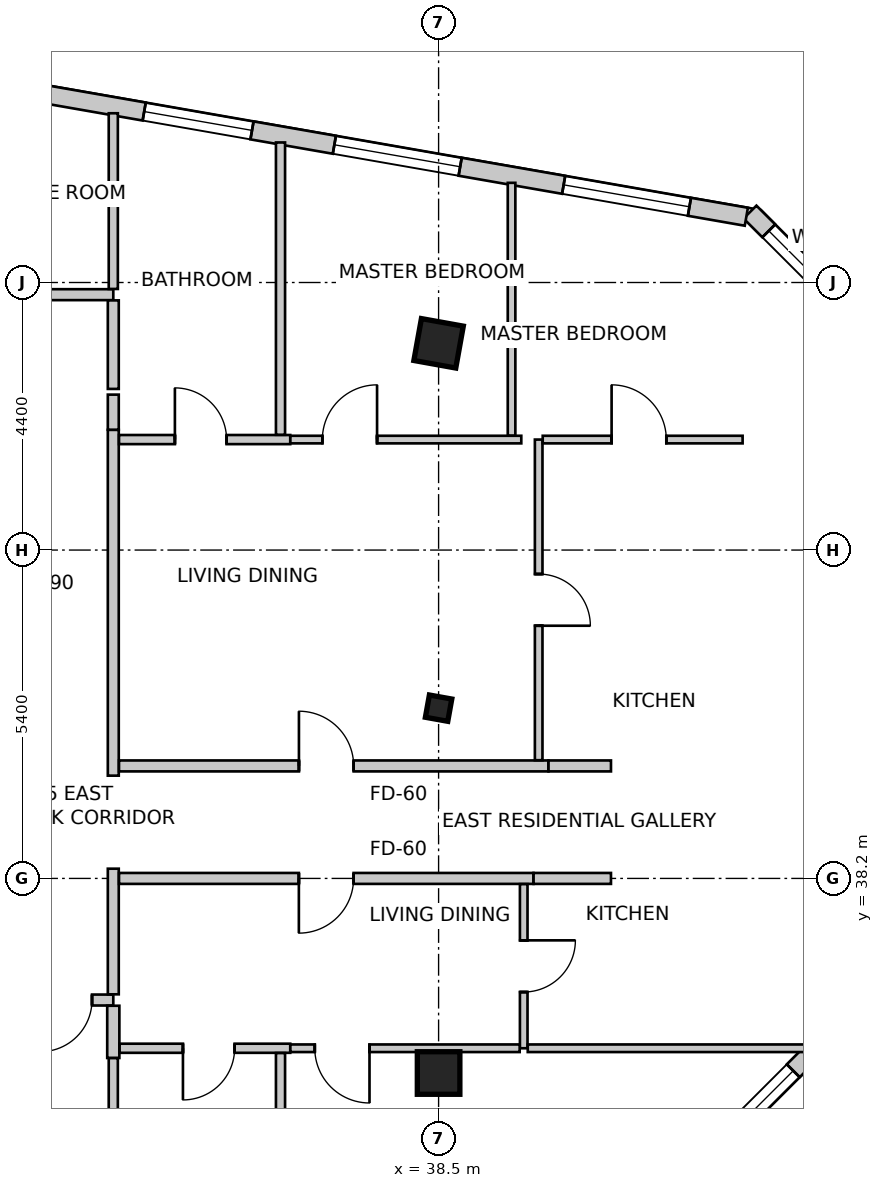
"""IFC4 building model, lengths in metres.
Left out: names, types, materials, properties, quantities, classifications, styles, units other than length and angle.
Written with IfcOpenShell. Run it as: python <this file> out.ifc"""

import sys

from ifc_helpers import new_model, si_unit, direction, frame, frame_2d, origin, origin_2d, place, context, subcontext, project, spatial, rectangle, i_section, extrude, source, transform, mapped, element, fill, save


model = new_model("IFC4")
c1 = context("Model", 3, precision=1e-05, world=origin(), true_north=direction((0.0, 1.0)))
c2 = subcontext(c1, "Body", "Model", "MODEL_VIEW")
j1 = project(units=[si_unit("LENGTHUNIT", "METRE"), si_unit("PLANEANGLEUNIT", "RADIAN")], contexts=[c1])
p1 = place(None, origin())
s1 = spatial("IfcSite", under=j1, at=p1, CompositionType="ELEMENT")
p2 = place(p1, origin())
s2 = spatial("IfcBuilding", under=s1, at=p2, CompositionType="ELEMENT")
p3 = place(p2, frame((0.0, 0.0, 218.4)))
s3 = spatial("IfcBuildingStorey", under=s2, at=p3, CompositionType="ELEMENT", Elevation=218.4)
m1 = source(origin(), c2, "Body", "SweptSolid", [
    extrude(rectangle(XDim=0.7, YDim=0.7, at=origin_2d()), origin(), (0.0, 0.0, 1.0), 3.5),
])
for number, where, z_axis, x_axis in (
    (1, (38.5, 47.0, 0.0), (0.0, 0.0, 1.0), (0.984, -0.177, 0.0)),
    (2, (38.5, 35.0, 0.0), (0.0, 0.0, 1.0), (1.0, 0.0, 0.0)),
):
    element("IfcColumn", number, at=place(p3, frame(where, z_axis=z_axis, x_axis=x_axis)), inside=s3, PredefinedType="COLUMN", context=c2, shape_type="MappedRepresentation", body=[
        mapped(m1, transform((0.0, 0.0, 0.0), scale=1.0)),
    ])
m2 = source(origin(), c2, "Body", "SweptSolid", [
    extrude(i_section(OverallWidth=0.374, OverallDepth=0.372, WebThickness=0.016, FlangeThickness=0.026, FilletRadius=0.015, at=origin_2d()), origin(), (0.0, 0.0, 1.0), 3.5),
])
p4 = place(p3, frame((38.5, 41.0, 0.0), z_axis=(0.0, 0.0, 1.0), x_axis=(0.984195607969, -0.17708474032, 0.0)))
e3 = element("IfcColumn", 3, at=p4, inside=s3, PredefinedType="COLUMN", context=c2, shape_type="MappedRepresentation", body=[
    mapped(m2, transform((0.0, 0.0, 0.0), scale=1.0)),
])
p5 = place(p3, frame((42.276, 32.98, 0.0), z_axis=(0.0, 0.0, 1.0), x_axis=(0.707106781187, 0.707106781187, 0.0)))
e4 = element("IfcWall", 4, at=p5, inside=s3, PredefinedType="SOLIDWALL", context=c2, shape_type="SweptSolid", body=[
    extrude(rectangle(XDim=4.922, YDim=0.3, at=frame_2d((2.461, 0.0))), origin(), (0.0, 0.0, 1.0), 3.25),
])
m3 = source(origin(), c2, "Body", "SweptSolid", [
    extrude(rectangle(XDim=2.4, YDim=2.2, at=frame_2d((1.2, 1.1))), frame((0.0, 0.16, 0.0), z_axis=(0.0, -1.0, 0.0), x_axis=(1.0, 0.0, 0.0)), (0.0, 0.0, 1.0), 0.32),
])
p6 = place(p5, frame((0.509, 0.0, 0.85)))
e5 = element("IfcOpeningElement", 5, at=p6, cuts=e4, PredefinedType="OPENING", context=c2, shape_type="MappedRepresentation", body=[
    mapped(m3, transform((0.0, 0.0, 0.0), scale=1.0)),
])
p7 = place(p3, frame((45.512, 47.268, 0.0), z_axis=(0.0, 0.0, 1.0), x_axis=(-0.707106781187, 0.707106781187, 0.0)))
e6 = element("IfcWall", 6, at=p7, inside=s3, PredefinedType="SOLIDWALL", context=c2, shape_type="SweptSolid", body=[
    extrude(rectangle(XDim=2.674, YDim=0.3, at=frame_2d((1.337, 0.0))), origin(), (0.0, 0.0, 1.0), 3.25),
])
m4 = source(origin(), c2, "Body", "SweptSolid", [
    extrude(rectangle(XDim=1.8, YDim=2.1, at=frame_2d((0.9, 1.05))), frame((0.0, 0.16, 0.0), z_axis=(0.0, -1.0, 0.0), x_axis=(1.0, 0.0, 0.0)), (0.0, 0.0, 1.0), 0.32),
])
p8 = place(p7, frame((0.437, 0.0, 0.85)))
e7 = element("IfcOpeningElement", 7, at=p8, cuts=e6, PredefinedType="OPENING", context=c2, shape_type="MappedRepresentation", body=[
    mapped(m4, transform((0.0, 0.0, 0.0), scale=1.0)),
])
p9 = place(p3, frame((43.561, 49.081, 0.0), z_axis=(0.0, 0.0, 1.0), x_axis=(-0.985083967494, 0.17207433564, 0.0)))
e8 = element("IfcWall", 8, at=p9, inside=s3, PredefinedType="SOLIDWALL", context=c2, shape_type="SweptSolid", body=[
    extrude(rectangle(XDim=22.006, YDim=0.3, at=frame_2d((11.003, 0.0))), origin(), (0.0, 0.0, 1.0), 3.25),
])
m5 = source(origin(), c2, "Body", "SweptSolid", [
    extrude(rectangle(XDim=2.1, YDim=2.0, at=frame_2d((1.05, 1.0))), frame((0.0, 0.16, 0.0), z_axis=(0.0, -1.0, 0.0), x_axis=(1.0, 0.0, 0.0)), (0.0, 0.0, 1.0), 0.32),
])
p10 = place(p9, frame((0.95, 0.0, 0.85)))
e9 = element("IfcOpeningElement", 9, at=p10, cuts=e8, PredefinedType="OPENING", context=c2, shape_type="MappedRepresentation", body=[
    mapped(m5, transform((0.0, 0.0, 0.0), scale=1.0)),
])
p11 = place(p9, frame((4.778, 0.0, 0.85)))
e10 = element("IfcOpeningElement", 10, at=p11, cuts=e8, PredefinedType="OPENING", context=c2, shape_type="MappedRepresentation", body=[
    mapped(m5, transform((0.0, 0.0, 0.0), scale=1.0)),
])
p12 = place(p9, frame((8.253, 0.0, 0.85)))
e11 = element("IfcOpeningElement", 11, at=p12, cuts=e8, PredefinedType="OPENING", context=c2, shape_type="MappedRepresentation", body=[
    mapped(m4, transform((0.0, 0.0, 0.0), scale=1.0)),
])
p13 = place(p9, frame((12.113, 0.0, 0.85)))
e12 = element("IfcOpeningElement", 12, at=p13, cuts=e8, PredefinedType="OPENING", context=c2, shape_type="MappedRepresentation", body=[
    mapped(m5, transform((0.0, 0.0, 0.0), scale=1.0)),
])
p14 = place(p9, frame((16.197, 0.0, 0.85)))
e13 = element("IfcOpeningElement", 13, at=p14, cuts=e8, PredefinedType="OPENING", context=c2, shape_type="MappedRepresentation", body=[
    mapped(m4, transform((0.0, 0.0, 0.0), scale=1.0)),
])
p15 = place(p9, frame((19.111, 0.0, 0.85)))
e14 = element("IfcOpeningElement", 14, at=p15, cuts=e8, PredefinedType="OPENING", context=c2, shape_type="MappedRepresentation", body=[
    mapped(m5, transform((0.0, 0.0, 0.0), scale=1.0)),
])
p16 = place(p3, frame((28.162, 47.8, 0.0), z_axis=(0.0, 0.0, 1.0), x_axis=(1.0, 0.0, 0.0)))
e15 = element("IfcWall", 15, at=p16, inside=s3, PredefinedType="PARTITIONING", context=c2, shape_type="SweptSolid", body=[
    extrude(rectangle(XDim=4.988, YDim=0.18, at=frame_2d((2.494, 0.0))), origin(), (0.0, 0.0, 1.0), 2.779),
])
m6 = source(origin(), c2, "Body", "SweptSolid", [
    extrude(rectangle(XDim=0.85, YDim=2.15, at=frame_2d((0.425, 1.075))), frame((0.0, 0.1, 0.0), z_axis=(0.0, -1.0, 0.0), x_axis=(1.0, 0.0, 0.0)), (0.0, 0.0, 1.0), 0.2),
])
p17 = place(p16, frame((0.403, 0.0, 0.0)))
e16 = element("IfcOpeningElement", 16, at=p17, cuts=e15, PredefinedType="OPENING", context=c2, shape_type="MappedRepresentation", body=[
    mapped(m6, transform((0.0, 0.0, 0.0), scale=1.0)),
])
p18 = place(p3, frame((33.15, 47.706, 0.0), z_axis=(0.0, 0.0, 1.0), x_axis=(0.0, -1.0, 0.0)))
e17 = element("IfcWall", 17, at=p18, inside=s3, PredefinedType="PARTITIONING", context=c2, shape_type="SweptSolid", body=[
    extrude(rectangle(XDim=1.456, YDim=0.18, at=frame_2d((0.728, 0.0))), origin(), (0.0, 0.0, 1.0), 2.919),
])
p19 = place(p3, frame((33.15, 36.2, 0.0), z_axis=(0.0, 0.0, 1.0), x_axis=(-1.0, 0.0, 0.0)))
e18 = element("IfcWall", 18, at=p19, inside=s3, PredefinedType="PARTITIONING", context=c2, shape_type="SweptSolid", body=[
    extrude(rectangle(XDim=1.48, YDim=0.18, at=frame_2d((0.74, 0.0))), origin(), (0.0, 0.0, 1.0), 3.25),
])
p20 = place(p19, frame((0.35, 0.0, 0.0)))
e19 = element("IfcOpeningElement", 19, at=p20, cuts=e18, PredefinedType="OPENING", context=c2, shape_type="MappedRepresentation", body=[
    mapped(m6, transform((0.0, 0.0, 0.0), scale=1.0)),
])
p21 = place(p3, frame((33.15, 45.577, 0.0), z_axis=(0.0, 0.0, 1.0), x_axis=(0.0, -1.0, 0.0)))
e20 = element("IfcWall", 20, at=p21, inside=s3, PredefinedType="PARTITIONING", context=c2, shape_type="SweptSolid", body=[
    extrude(rectangle(XDim=5.687, YDim=0.18, at=frame_2d((2.844, 0.0))), origin(), (0.0, 0.0, 1.0), 2.779),
])
p22 = place(p3, frame((33.15, 46.156, 0.0), z_axis=(0.0, 0.0, 1.0), x_axis=(0.0, -1.0, 0.0)))
e21 = element("IfcWall", 21, at=p22, inside=s3, PredefinedType="PARTITIONING", context=c2, shape_type="SweptSolid", body=[
    extrude(rectangle(XDim=0.577, YDim=0.18, at=frame_2d((0.289, 0.0))), origin(), (0.0, 0.0, 1.0), 2.779),
])
p23 = place(p3, frame((33.15, 38.36, 0.0), z_axis=(0.0, 0.0, 1.0), x_axis=(0.0, -1.0, 0.0)))
e22 = element("IfcWall", 22, at=p23, inside=s3, PredefinedType="PARTITIONING", context=c2, shape_type="SweptSolid", body=[
    extrude(rectangle(XDim=2.066, YDim=0.18, at=frame_2d((1.033, 0.0))), origin(), (0.0, 0.0, 1.0), 3.25),
])
p24 = place(p3, frame((33.15, 50.783, 0.0), z_axis=(0.0, 0.0, 1.0), x_axis=(0.0, -1.0, 0.0)))
e23 = element("IfcWall", 23, at=p24, inside=s3, PredefinedType="PARTITIONING", context=c2, shape_type="SweptSolid", body=[
    extrude(rectangle(XDim=2.889, YDim=0.15, at=frame_2d((1.445, 0.0))), origin(), (0.0, 0.0, 1.0), 2.542),
])
p25 = place(p3, frame((33.244, 40.05, 0.0), z_axis=(0.0, 0.0, 1.0), x_axis=(1.0, 0.0, 0.0)))
e24 = element("IfcWall", 24, at=p25, inside=s3, PredefinedType="PARTITIONING", context=c2, shape_type="SweptSolid", body=[
    extrude(rectangle(XDim=7.062, YDim=0.18, at=frame_2d((3.531, 0.0))), origin(), (0.0, 0.0, 1.0), 2.766),
])
m7 = source(origin(), c2, "Body", "SweptSolid", [
    extrude(rectangle(XDim=0.9, YDim=2.15, at=frame_2d((0.45, 1.075))), frame((0.0, 0.1, 0.0), z_axis=(0.0, -1.0, 0.0), x_axis=(1.0, 0.0, 0.0)), (0.0, 0.0, 1.0), 0.2),
])
p26 = place(p25, frame((2.959, 0.0, 0.0)))
e25 = element("IfcOpeningElement", 25, at=p26, cuts=e24, PredefinedType="OPENING", context=c2, shape_type="MappedRepresentation", body=[
    mapped(m7, transform((0.0, 0.0, 0.0), scale=1.0)),
])
p27 = place(p3, frame((40.308, 40.05, 0.0), z_axis=(0.0, 0.0, 1.0), x_axis=(1.0, 0.0, 0.0)))
e26 = element("IfcWall", 26, at=p27, inside=s3, PredefinedType="PARTITIONING", context=c2, shape_type="SweptSolid", body=[
    extrude(rectangle(XDim=1.027, YDim=0.18, at=frame_2d((0.513, 0.0))), origin(), (0.0, 0.0, 1.0), 3.25),
])
p28 = place(p3, frame((40.06, 38.2, 0.0), z_axis=(0.0, 0.0, 1.0), x_axis=(-1.0, 0.0, 0.0)))
e27 = element("IfcWall", 27, at=p28, inside=s3, PredefinedType="PARTITIONING", context=c2, shape_type="SweptSolid", body=[
    extrude(rectangle(XDim=6.816, YDim=0.18, at=frame_2d((3.408, 0.0))), origin(), (0.0, 0.0, 1.0), 2.766),
])
p29 = place(p28, frame((2.958, 0.0, 0.0)))
e28 = element("IfcOpeningElement", 28, at=p29, cuts=e27, PredefinedType="OPENING", context=c2, shape_type="MappedRepresentation", body=[
    mapped(m7, transform((0.0, 0.0, 0.0), scale=1.0)),
])
p30 = place(p3, frame((41.335, 38.2, 0.0), z_axis=(0.0, 0.0, 1.0), x_axis=(-1.0, 0.0, 0.0)))
e29 = element("IfcWall", 29, at=p30, inside=s3, PredefinedType="PARTITIONING", context=c2, shape_type="SweptSolid", body=[
    extrude(rectangle(XDim=1.273, YDim=0.18, at=frame_2d((0.636, 0.0))), origin(), (0.0, 0.0, 1.0), 3.25),
])
p31 = place(p3, frame((33.15, 36.106, 0.0), z_axis=(0.0, 0.0, 1.0), x_axis=(0.0, -1.0, 0.0)))
e30 = element("IfcWall", 30, at=p31, inside=s3, PredefinedType="PARTITIONING", context=c2, shape_type="SweptSolid", body=[
    extrude(rectangle(XDim=0.859, YDim=0.2, at=frame_2d((0.429, 0.0))), origin(), (0.0, 0.0, 1.0), 3.25),
])
p32 = place(p3, frame((33.15, 35.245, 0.0), z_axis=(0.0, 0.0, 1.0), x_axis=(0.0, -1.0, 0.0)))
e31 = element("IfcWall", 31, at=p32, inside=s3, PredefinedType="PARTITIONING", context=c2, shape_type="SweptSolid", body=[
    extrude(rectangle(XDim=2.288, YDim=0.15, at=frame_2d((1.144, 0.0))), origin(), (0.0, 0.0, 1.0), 3.25),
])
p33 = place(p3, frame((40.146, 45.417, 0.0), z_axis=(0.0, 0.0, 1.0), x_axis=(0.0, -1.0, 0.0)))
e32 = element("IfcWall", 32, at=p33, inside=s3, PredefinedType="PARTITIONING", context=c2, shape_type="SweptSolid", body=[
    extrude(rectangle(XDim=5.273, YDim=0.125, at=frame_2d((2.636, 0.0))), origin(), (0.0, 0.0, 1.0), 3.25),
])
m8 = source(origin(), c2, "Body", "SweptSolid", [
    extrude(rectangle(XDim=0.85, YDim=2.15, at=frame_2d((0.425, 1.075))), frame((0.0, 0.073, 0.0), z_axis=(0.0, -1.0, 0.0), x_axis=(1.0, 0.0, 0.0)), (0.0, 0.0, 1.0), 0.145),
])
p34 = place(p33, frame((2.211, 0.0, 0.0)))
e33 = element("IfcOpeningElement", 33, at=p34, cuts=e32, PredefinedType="OPENING", context=c2, shape_type="MappedRepresentation", body=[
    mapped(m8, transform((0.0, 0.0, 0.0), scale=1.0)),
])
p35 = place(p3, frame((33.244, 45.417, 0.0), z_axis=(0.0, 0.0, 1.0), x_axis=(1.0, 0.0, 0.0)))
e34 = element("IfcWall", 34, at=p35, inside=s3, PredefinedType="PARTITIONING", context=c2, shape_type="SweptSolid", body=[
    extrude(rectangle(XDim=2.816, YDim=0.15, at=frame_2d((1.408, 0.0))), origin(), (0.0, 0.0, 1.0), 2.919),
])
m9 = source(origin(), c2, "Body", "SweptSolid", [
    extrude(rectangle(XDim=0.85, YDim=2.15, at=frame_2d((0.425, 1.075))), frame((0.0, 0.085, 0.0), z_axis=(0.0, -1.0, 0.0), x_axis=(1.0, 0.0, 0.0)), (0.0, 0.0, 1.0), 0.17),
])
p36 = place(p35, frame((0.919, 0.0, 0.0)))
e35 = element("IfcOpeningElement", 35, at=p36, cuts=e34, PredefinedType="OPENING", context=c2, shape_type="MappedRepresentation", body=[
    mapped(m9, transform((0.0, 0.0, 0.0), scale=1.0)),
])
p37 = place(p3, frame((36.062, 45.417, 0.0), z_axis=(0.0, 0.0, 1.0), x_axis=(1.0, 0.0, 0.0)))
e36 = element("IfcWall", 36, at=p37, inside=s3, PredefinedType="PARTITIONING", context=c2, shape_type="SweptSolid", body=[
    extrude(rectangle(XDim=3.798, YDim=0.125, at=frame_2d((1.899, 0.0))), origin(), (0.0, 0.0, 1.0), 2.766),
])
m10 = source(origin(), c2, "Body", "SweptSolid", [
    extrude(rectangle(XDim=0.9, YDim=2.15, at=frame_2d((0.45, 1.075))), frame((0.0, 0.073, 0.0), z_axis=(0.0, -1.0, 0.0), x_axis=(1.0, 0.0, 0.0)), (0.0, 0.0, 1.0), 0.145),
])
p38 = place(p37, frame((0.526, 0.0, 0.0)))
e37 = element("IfcOpeningElement", 37, at=p38, cuts=e36, PredefinedType="OPENING", context=c2, shape_type="MappedRepresentation", body=[
    mapped(m10, transform((0.0, 0.0, 0.0), scale=1.0)),
])
p39 = place(p3, frame((40.212, 45.417, 0.0), z_axis=(0.0, 0.0, 1.0), x_axis=(1.0, 0.0, 0.0)))
e38 = element("IfcWall", 38, at=p39, inside=s3, PredefinedType="PARTITIONING", context=c2, shape_type="SweptSolid", body=[
    extrude(rectangle(XDim=3.288, YDim=0.125, at=frame_2d((1.644, 0.0))), origin(), (0.0, 0.0, 1.0), 3.25),
])
p40 = place(p39, frame((1.133, 0.0, 0.0)))
e39 = element("IfcOpeningElement", 39, at=p40, cuts=e38, PredefinedType="OPENING", context=c2, shape_type="MappedRepresentation", body=[
    mapped(m10, transform((0.0, 0.0, 0.0), scale=1.0)),
])
p41 = place(p3, frame((35.9, 50.303, 0.0), z_axis=(0.0, 0.0, 1.0), x_axis=(0.0, -1.0, 0.0)))
e40 = element("IfcWall", 40, at=p41, inside=s3, PredefinedType="PARTITIONING", context=c2, shape_type="SweptSolid", body=[
    extrude(rectangle(XDim=4.807, YDim=0.15, at=frame_2d((2.403, 0.0))), origin(), (0.0, 0.0, 1.0), 2.542),
])
p42 = place(p3, frame((39.7, 49.639, 0.0), z_axis=(0.0, 0.0, 1.0), x_axis=(0.0, -1.0, 0.0)))
e41 = element("IfcWall", 41, at=p42, inside=s3, PredefinedType="PARTITIONING", context=c2, shape_type="SweptSolid", body=[
    extrude(rectangle(XDim=4.156, YDim=0.125, at=frame_2d((2.078, 0.0))), origin(), (0.0, 0.0, 1.0), 3.25),
])
p43 = place(p3, frame((39.9, 38.106, 0.0), z_axis=(0.0, 0.0, 1.0), x_axis=(0.0, -1.0, 0.0)))
e42 = element("IfcWall", 42, at=p43, inside=s3, PredefinedType="PARTITIONING", context=c2, shape_type="SweptSolid", body=[
    extrude(rectangle(XDim=2.699, YDim=0.125, at=frame_2d((1.35, 0.0))), origin(), (0.0, 0.0, 1.0), 3.25),
])
p44 = place(p43, frame((0.925, 0.0, 0.0)))
e43 = element("IfcOpeningElement", 43, at=p44, cuts=e42, PredefinedType="OPENING", context=c2, shape_type="MappedRepresentation", body=[
    mapped(m8, transform((0.0, 0.0, 0.0), scale=1.0)),
])
p45 = place(p3, frame((36.06, 35.407, 0.0), z_axis=(0.0, 0.0, 1.0), x_axis=(-1.0, 0.0, 0.0)))
e44 = element("IfcWall", 44, at=p45, inside=s3, PredefinedType="PARTITIONING", context=c2, shape_type="SweptSolid", body=[
    extrude(rectangle(XDim=2.806, YDim=0.15, at=frame_2d((1.403, 0.0))), origin(), (0.0, 0.0, 1.0), 3.25),
])
p46 = place(p45, frame((0.915, 0.0, 0.0)))
e45 = element("IfcOpeningElement", 45, at=p46, cuts=e44, PredefinedType="OPENING", context=c2, shape_type="MappedRepresentation", body=[
    mapped(m9, transform((0.0, 0.0, 0.0), scale=1.0)),
])
p47 = place(p3, frame((39.833, 35.407, 0.0), z_axis=(0.0, 0.0, 1.0), x_axis=(-1.0, 0.0, 0.0)))
e46 = element("IfcWall", 46, at=p47, inside=s3, PredefinedType="PARTITIONING", context=c2, shape_type="SweptSolid", body=[
    extrude(rectangle(XDim=3.771, YDim=0.125, at=frame_2d((1.886, 0.0))), origin(), (0.0, 0.0, 1.0), 2.766),
])
p48 = place(p47, frame((2.47, 0.0, 0.0)))
e47 = element("IfcOpeningElement", 47, at=p48, cuts=e46, PredefinedType="OPENING", context=c2, shape_type="MappedRepresentation", body=[
    mapped(m10, transform((0.0, 0.0, 0.0), scale=1.0)),
])
p49 = place(p3, frame((44.54, 35.407, 0.0), z_axis=(0.0, 0.0, 1.0), x_axis=(-1.0, 0.0, 0.0)))
e48 = element("IfcWall", 48, at=p49, inside=s3, PredefinedType="PARTITIONING", context=c2, shape_type="SweptSolid", body=[
    extrude(rectangle(XDim=4.574, YDim=0.125, at=frame_2d((2.287, 0.0))), origin(), (0.0, 0.0, 1.0), 3.25),
])
p50 = place(p3, frame((35.9, 35.328, 0.0), z_axis=(0.0, 0.0, 1.0), x_axis=(0.0, -1.0, 0.0)))
e49 = element("IfcWall", 49, at=p50, inside=s3, PredefinedType="PARTITIONING", context=c2, shape_type="SweptSolid", body=[
    extrude(rectangle(XDim=2.371, YDim=0.15, at=frame_2d((1.186, 0.0))), origin(), (0.0, 0.0, 1.0), 3.25),
])
m11 = source(origin(), c2, "Body", "SweptSolid", [
    extrude(rectangle(XDim=2.4, YDim=2.2, at=frame_2d((1.2, 1.1))), frame((0.0, -0.015, 0.0), z_axis=(0.0, -1.0, 0.0), x_axis=(1.0, 0.0, 0.0)), (0.0, 0.0, 1.0), 0.06),
])
p51 = place(p6, origin())
e50 = element("IfcWindow", 50, at=p51, inside=s3, PartitioningType="SINGLE_PANEL", PredefinedType="WINDOW", context=c2, shape_type="MappedRepresentation", body=[
    mapped(m11, transform((0.0, 0.0, 0.0), scale=1.0)),
])
fill(e5, e50)
m12 = source(origin(), c2, "Body", "SweptSolid", [
    extrude(rectangle(XDim=1.8, YDim=2.1, at=frame_2d((0.9, 1.05))), frame((0.0, -0.015, 0.0), z_axis=(0.0, -1.0, 0.0), x_axis=(1.0, 0.0, 0.0)), (0.0, 0.0, 1.0), 0.06),
])
p52 = place(p8, origin())
e51 = element("IfcWindow", 51, at=p52, inside=s3, PartitioningType="SINGLE_PANEL", PredefinedType="WINDOW", context=c2, shape_type="MappedRepresentation", body=[
    mapped(m12, transform((0.0, 0.0, 0.0), scale=1.0)),
])
fill(e7, e51)
m13 = source(origin(), c2, "Body", "SweptSolid", [
    extrude(rectangle(XDim=2.1, YDim=2.0, at=frame_2d((1.05, 1.0))), frame((0.0, -0.015, 0.0), z_axis=(0.0, -1.0, 0.0), x_axis=(1.0, 0.0, 0.0)), (0.0, 0.0, 1.0), 0.06),
])
p53 = place(p10, origin())
e52 = element("IfcWindow", 52, at=p53, inside=s3, PartitioningType="SINGLE_PANEL", PredefinedType="WINDOW", context=c2, shape_type="MappedRepresentation", body=[
    mapped(m13, transform((0.0, 0.0, 0.0), scale=1.0)),
])
fill(e9, e52)
p54 = place(p11, origin())
e53 = element("IfcWindow", 53, at=p54, inside=s3, PartitioningType="SINGLE_PANEL", PredefinedType="WINDOW", context=c2, shape_type="MappedRepresentation", body=[
    mapped(m13, transform((0.0, 0.0, 0.0), scale=1.0)),
])
fill(e10, e53)
p55 = place(p12, origin())
e54 = element("IfcWindow", 54, at=p55, inside=s3, PartitioningType="SINGLE_PANEL", PredefinedType="WINDOW", context=c2, shape_type="MappedRepresentation", body=[
    mapped(m12, transform((0.0, 0.0, 0.0), scale=1.0)),
])
fill(e11, e54)
m14 = source(origin(), c2, "Body", "SweptSolid", [
    extrude(rectangle(XDim=0.85, YDim=2.15, at=frame_2d((0.425, 1.075))), frame((0.0, 0.025, 0.0), z_axis=(0.0, -1.0, 0.0), x_axis=(1.0, 0.0, 0.0)), (0.0, 0.0, 1.0), 0.05),
])
p56 = place(p20, origin())
e55 = element("IfcDoor", 55, at=p56, inside=s3, OperationType="SINGLE_SWING_RIGHT", PredefinedType="DOOR", context=c2, shape_type="MappedRepresentation", body=[
    mapped(m14, transform((0.0, 0.0, 0.0), scale=1.0)),
])
fill(e19, e55)
m15 = source(origin(), c2, "Body", "SweptSolid", [
    extrude(rectangle(XDim=0.9, YDim=2.15, at=frame_2d((0.45, 1.075))), frame((0.0, 0.025, 0.0), z_axis=(0.0, -1.0, 0.0), x_axis=(1.0, 0.0, 0.0)), (0.0, 0.0, 1.0), 0.05),
])
p57 = place(p26, origin())
e56 = element("IfcDoor", 56, at=p57, inside=s3, OperationType="SINGLE_SWING_LEFT", PredefinedType="DOOR", context=c2, shape_type="MappedRepresentation", body=[
    mapped(m15, transform((0.0, 0.0, 0.0), scale=1.0)),
])
fill(e25, e56)
p58 = place(p34, origin())
e57 = element("IfcDoor", 57, at=p58, inside=s3, OperationType="SINGLE_SWING_RIGHT", PredefinedType="DOOR", context=c2, shape_type="MappedRepresentation", body=[
    mapped(m14, transform((0.0, 0.0, 0.0), scale=1.0)),
])
fill(e33, e57)
p59 = place(p36, origin())
e58 = element("IfcDoor", 58, at=p59, inside=s3, OperationType="SINGLE_SWING_LEFT", PredefinedType="DOOR", context=c2, shape_type="MappedRepresentation", body=[
    mapped(m14, transform((0.0, 0.0, 0.0), scale=1.0)),
])
fill(e35, e58)
m16 = source(origin(), c2, "Body", "SweptSolid", [
    extrude(rectangle(XDim=0.9, YDim=2.15, at=frame_2d((0.45, 1.075))), frame((0.0, 0.025, 0.0), z_axis=(0.0, -1.0, 0.0), x_axis=(1.0, 0.0, 0.0)), (0.0, 0.0, 1.0), 0.05),
])
p60 = place(p38, origin())
e59 = element("IfcDoor", 59, at=p60, inside=s3, OperationType="SINGLE_SWING_RIGHT", PredefinedType="DOOR", context=c2, shape_type="MappedRepresentation", body=[
    mapped(m16, transform((0.0, 0.0, 0.0), scale=1.0)),
])
fill(e37, e59)
p61 = place(p40, origin())
e60 = element("IfcDoor", 60, at=p61, inside=s3, OperationType="SINGLE_SWING_LEFT", PredefinedType="DOOR", context=c2, shape_type="MappedRepresentation", body=[
    mapped(m16, transform((0.0, 0.0, 0.0), scale=1.0)),
])
fill(e39, e60)
p62 = place(p29, origin())
e61 = element("IfcDoor", 61, at=p62, inside=s3, OperationType="SINGLE_SWING_RIGHT", PredefinedType="DOOR", context=c2, shape_type="MappedRepresentation", body=[
    mapped(m15, transform((0.0, 0.0, 0.0), scale=1.0)),
])
fill(e28, e61)
p63 = place(p44, origin())
e62 = element("IfcDoor", 62, at=p63, inside=s3, OperationType="SINGLE_SWING_LEFT", PredefinedType="DOOR", context=c2, shape_type="MappedRepresentation", body=[
    mapped(m14, transform((0.0, 0.0, 0.0), scale=1.0)),
])
fill(e43, e62)
p64 = place(p46, origin())
e63 = element("IfcDoor", 63, at=p64, inside=s3, OperationType="SINGLE_SWING_RIGHT", PredefinedType="DOOR", context=c2, shape_type="MappedRepresentation", body=[
    mapped(m14, transform((0.0, 0.0, 0.0), scale=1.0)),
])
fill(e45, e63)
p65 = place(p48, origin())
e64 = element("IfcDoor", 64, at=p65, inside=s3, OperationType="SINGLE_SWING_LEFT", PredefinedType="DOOR", context=c2, shape_type="MappedRepresentation", body=[
    mapped(m16, transform((0.0, 0.0, 0.0), scale=1.0)),
])
fill(e47, e64)
save(model, sys.argv[1])
